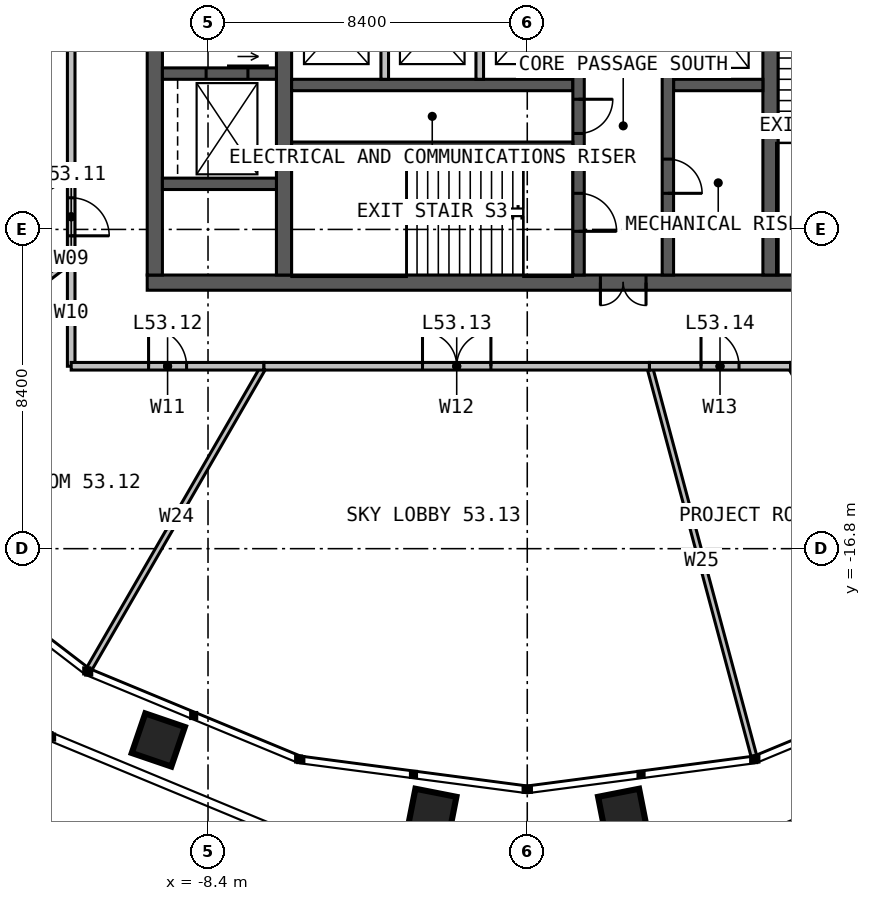
"""IFC4 building model, lengths in metres.
Left out: names, types, materials, properties, quantities, classifications, styles, units other than length and angle.
Written with IfcOpenShell. Run it as: python <this file> out.ifc"""

import sys

from ifc_helpers import new_model, si_unit, direction, frame, frame_2d, origin, place, context, subcontext, project, spatial, rectangle, extrude, element, fill, save


model = new_model("IFC4")
c1 = context("Model", 3, precision=1e-05, world=origin(), true_north=direction((0.0, 1.0)))
c2 = subcontext(c1, "Body", "Model", "MODEL_VIEW")
j1 = project(units=[si_unit("LENGTHUNIT", "METRE"), si_unit("PLANEANGLEUNIT", "RADIAN")], contexts=[c1])
p1 = place(None, origin())
s1 = spatial("IfcSite", under=j1, at=p1, CompositionType="ELEMENT")
p2 = place(p1, origin())
s2 = spatial("IfcBuilding", under=s1, at=p2, CompositionType="ELEMENT")
p3 = place(p2, frame((0.0, 0.0, 220.0)))
s3 = spatial("IfcBuildingStorey", under=s2, at=p3, CompositionType="ELEMENT", Elevation=220.0)
p4 = place(p3, frame((10.0, -9.8, 0.0), z_axis=(0.0, 0.0, 1.0), x_axis=(-1.0, 0.0, 0.0)))
e1 = element("IfcWall", 1, at=p4, inside=s3, PredefinedType="SOLIDWALL", context=c2, shape_type="SweptSolid", body=[
    extrude(rectangle(XDim=20.0, YDim=0.4, at=frame_2d((10.0, 0.0))), origin(), (0.0, 0.0, 1.0), 4.0),
])
p5 = place(p4, frame((6.875, 0.0, 0.0)))
e2 = element("IfcOpeningElement", 2, at=p5, cuts=e1, PredefinedType="OPENING", context=c2, shape_type="SweptSolid", body=[
    extrude(rectangle(XDim=1.2, YDim=2.2, at=frame_2d((0.6, 1.1))), frame((0.0, 0.21, 0.0), z_axis=(0.0, -1.0, 0.0), x_axis=(1.0, 0.0, 0.0)), (0.0, 0.0, 1.0), 0.42),
])
p6 = place(p3, frame((-9.8, 9.6, 0.0), z_axis=(0.0, 0.0, 1.0), x_axis=(0.0, -1.0, 0.0)))
e3 = element("IfcWall", 3, at=p6, inside=s3, PredefinedType="SOLIDWALL", context=c2, shape_type="SweptSolid", body=[
    extrude(rectangle(XDim=19.2, YDim=0.4, at=frame_2d((9.6, 0.0))), origin(), (0.0, 0.0, 1.0), 4.0),
])
p7 = place(p3, frame((-6.4, -9.6, 0.0), z_axis=(0.0, 0.0, 1.0), x_axis=(0.0, 1.0, 0.0)))
e4 = element("IfcWall", 4, at=p7, inside=s3, PredefinedType="SOLIDWALL", context=c2, shape_type="SweptSolid", body=[
    extrude(rectangle(XDim=19.2, YDim=0.4, at=frame_2d((9.6, 0.0))), origin(), (0.0, 0.0, 1.0), 4.0),
])
p8 = place(p7, frame((9.1, 0.0, 0.0)))
e5 = element("IfcOpeningElement", 5, at=p8, cuts=e4, PredefinedType="OPENING", context=c2, shape_type="SweptSolid", body=[
    extrude(rectangle(XDim=1.0, YDim=2.2, at=frame_2d((0.5, 1.1))), frame((0.0, 0.21, 0.0), z_axis=(0.0, -1.0, 0.0), x_axis=(1.0, 0.0, 0.0)), (0.0, 0.0, 1.0), 0.42),
])
p9 = place(p3, frame((6.4, 9.6, 0.0), z_axis=(0.0, 0.0, 1.0), x_axis=(0.0, -1.0, 0.0)))
e6 = element("IfcWall", 6, at=p9, inside=s3, PredefinedType="SOLIDWALL", context=c2, shape_type="SweptSolid", body=[
    extrude(rectangle(XDim=19.2, YDim=0.4, at=frame_2d((9.6, 0.0))), origin(), (0.0, 0.0, 1.0), 4.0),
])
p10 = place(p9, frame((9.1, 0.0, 0.0)))
e7 = element("IfcOpeningElement", 7, at=p10, cuts=e6, PredefinedType="OPENING", context=c2, shape_type="SweptSolid", body=[
    extrude(rectangle(XDim=1.0, YDim=2.2, at=frame_2d((0.5, 1.1))), frame((0.0, 0.21, 0.0), z_axis=(0.0, -1.0, 0.0), x_axis=(1.0, 0.0, 0.0)), (0.0, 0.0, 1.0), 0.42),
])
p11 = place(p3, frame((-6.2, -4.6, 0.0), z_axis=(0.0, 0.0, 1.0), x_axis=(1.0, 0.0, 0.0)))
e8 = element("IfcWall", 8, at=p11, inside=s3, PredefinedType="SOLIDWALL", context=c2, shape_type="SweptSolid", body=[
    extrude(rectangle(XDim=7.4, YDim=0.3, at=frame_2d((3.7, 0.0))), origin(), (0.0, 0.0, 1.0), 4.0),
])
p12 = place(p3, frame((3.85, -4.6, 0.0), z_axis=(0.0, 0.0, 1.0), x_axis=(1.0, 0.0, 0.0)))
e9 = element("IfcWall", 9, at=p12, inside=s3, PredefinedType="SOLIDWALL", context=c2, shape_type="SweptSolid", body=[
    extrude(rectangle(XDim=2.35, YDim=0.3, at=frame_2d((1.175, 0.0))), origin(), (0.0, 0.0, 1.0), 4.0),
])
p13 = place(p3, frame((1.35, -1.45, 0.0), z_axis=(0.0, 0.0, 1.0), x_axis=(0.0, -1.0, 0.0)))
e10 = element("IfcWall", 10, at=p13, inside=s3, PredefinedType="SOLIDWALL", context=c2, shape_type="SweptSolid", body=[
    extrude(rectangle(XDim=8.15, YDim=0.3, at=frame_2d((4.075, 0.0))), origin(), (0.0, 0.0, 1.0), 4.0),
])
p14 = place(p13, frame((6.0, 0.0, 0.0)))
e11 = element("IfcOpeningElement", 11, at=p14, cuts=e10, PredefinedType="OPENING", context=c2, shape_type="SweptSolid", body=[
    extrude(rectangle(XDim=1.0, YDim=2.2, at=frame_2d((0.5, 1.1))), frame((0.0, 0.16, 0.0), z_axis=(0.0, -1.0, 0.0), x_axis=(1.0, 0.0, 0.0)), (0.0, 0.0, 1.0), 0.32),
])
p15 = place(p13, frame((3.525, 0.0, 0.0)))
e12 = element("IfcOpeningElement", 12, at=p15, cuts=e10, PredefinedType="OPENING", context=c2, shape_type="SweptSolid", body=[
    extrude(rectangle(XDim=0.9, YDim=2.2, at=frame_2d((0.45, 1.1))), frame((0.0, 0.16, 0.0), z_axis=(0.0, -1.0, 0.0), x_axis=(1.0, 0.0, 0.0)), (0.0, 0.0, 1.0), 0.32),
])
p16 = place(p3, frame((3.7, -1.45, 0.0), z_axis=(0.0, 0.0, 1.0), x_axis=(0.0, -1.0, 0.0)))
e13 = element("IfcWall", 13, at=p16, inside=s3, PredefinedType="SOLIDWALL", context=c2, shape_type="SweptSolid", body=[
    extrude(rectangle(XDim=8.15, YDim=0.3, at=frame_2d((4.075, 0.0))), origin(), (0.0, 0.0, 1.0), 4.0),
])
p17 = place(p16, frame((5.1, 0.0, 0.0)))
e14 = element("IfcOpeningElement", 14, at=p17, cuts=e13, PredefinedType="OPENING", context=c2, shape_type="SweptSolid", body=[
    extrude(rectangle(XDim=0.9, YDim=2.2, at=frame_2d((0.45, 1.1))), frame((0.0, 0.16, 0.0), z_axis=(0.0, -1.0, 0.0), x_axis=(1.0, 0.0, 0.0)), (0.0, 0.0, 1.0), 0.32),
])
p18 = place(p3, frame((-6.2, -6.2, 0.0), z_axis=(0.0, 0.0, 1.0), x_axis=(1.0, 0.0, 0.0)))
e15 = element("IfcWall", 15, at=p18, inside=s3, PredefinedType="SOLIDWALL", context=c2, shape_type="SweptSolid", body=[
    extrude(rectangle(XDim=7.4, YDim=0.2, at=frame_2d((3.7, 0.0))), origin(), (0.0, 0.0, 1.0), 4.0),
])
p19 = place(p3, frame((-9.6, -4.3, 0.0), z_axis=(0.0, 0.0, 1.0), x_axis=(1.0, 0.0, 0.0)))
e16 = element("IfcWall", 16, at=p19, inside=s3, PredefinedType="SOLIDWALL", context=c2, shape_type="SweptSolid", body=[
    extrude(rectangle(XDim=3.0, YDim=0.3, at=frame_2d((1.5, 0.0))), origin(), (0.0, 0.0, 1.0), 4.0),
])
p20 = place(p19, frame((1.15, 0.0, 0.0)))
e17 = element("IfcOpeningElement", 17, at=p20, cuts=e16, PredefinedType="OPENING", context=c2, shape_type="SweptSolid", body=[
    extrude(rectangle(XDim=1.1, YDim=2.2, at=frame_2d((0.55, 1.1))), frame((0.0, 0.16, 0.0), z_axis=(0.0, -1.0, 0.0), x_axis=(1.0, 0.0, 0.0)), (0.0, 0.0, 1.0), 0.32),
])
p21 = place(p3, frame((-9.6, -7.2, 0.0), z_axis=(0.0, 0.0, 1.0), x_axis=(1.0, 0.0, 0.0)))
e18 = element("IfcWall", 18, at=p21, inside=s3, PredefinedType="SOLIDWALL", context=c2, shape_type="SweptSolid", body=[
    extrude(rectangle(XDim=3.0, YDim=0.3, at=frame_2d((1.5, 0.0))), origin(), (0.0, 0.0, 1.0), 4.0),
])
for number, where, z_axis, x_axis in (
    (19, (-3.75, -1.75, 0.0), (0.0, 0.0, 1.0), (0.0, -1.0, 0.0)),
    (20, (-1.25, -1.75, 0.0), (0.0, 0.0, 1.0), (0.0, -1.0, 0.0)),
):
    element("IfcWall", number, at=place(p3, frame(where, z_axis=z_axis, x_axis=x_axis)), inside=s3, PredefinedType="SOLIDWALL", context=c2, shape_type="SweptSolid", body=[
        extrude(rectangle(XDim=2.7, YDim=0.2, at=frame_2d((1.35, 0.0))), origin(), (0.0, 0.0, 1.0), 3.75),
    ])
p22 = place(p3, frame((-12.0, -6.928, 0.0), z_axis=(0.0, 0.0, 1.0), x_axis=(-0.866021843099, -0.500006167237, 0.0)))
e21 = element("IfcWall", 21, at=p22, inside=s3, PredefinedType="PARTITIONING", context=c2, shape_type="SweptSolid", body=[
    extrude(rectangle(XDim=9.187, YDim=0.15, at=frame_2d((4.594, 0.0))), origin(), (0.0, 0.0, 1.0), 2.89),
])
p23 = place(p3, frame((-12.0, -9.208, 0.0), z_axis=(0.0, 0.0, 1.0), x_axis=(-0.793364023141, -0.608747506595, 0.0)))
e22 = element("IfcWall", 22, at=p23, inside=s3, PredefinedType="PARTITIONING", context=c2, shape_type="SweptSolid", body=[
    extrude(rectangle(XDim=7.72, YDim=0.15, at=frame_2d((3.86, 0.0))), origin(), (0.0, 0.0, 1.0), 2.79),
])
p24 = place(p3, frame((-6.928, -12.0, 0.0), z_axis=(0.0, 0.0, 1.0), x_axis=(-0.500006167237, -0.866021843099, 0.0)))
e23 = element("IfcWall", 23, at=p24, inside=s3, PredefinedType="PARTITIONING", context=c2, shape_type="SweptSolid", body=[
    extrude(rectangle(XDim=9.187, YDim=0.15, at=frame_2d((4.594, 0.0))), origin(), (0.0, 0.0, 1.0), 2.89),
])
p25 = place(p3, frame((3.215, -12.0, 0.0), z_axis=(0.0, 0.0, 1.0), x_axis=(0.258831459304, -0.965922499828, 0.0)))
e24 = element("IfcWall", 24, at=p25, inside=s3, PredefinedType="PARTITIONING", context=c2, shape_type="SweptSolid", body=[
    extrude(rectangle(XDim=10.62, YDim=0.15, at=frame_2d((5.31, 0.0))), origin(), (0.0, 0.0, 1.0), 2.89),
])
p26 = place(p3, frame((6.928, -12.0, 0.0), z_axis=(0.0, 0.0, 1.0), x_axis=(0.500006167237, -0.866021843099, 0.0)))
e25 = element("IfcWall", 25, at=p26, inside=s3, PredefinedType="PARTITIONING", context=c2, shape_type="SweptSolid", body=[
    extrude(rectangle(XDim=9.187, YDim=0.15, at=frame_2d((4.594, 0.0))), origin(), (0.0, 0.0, 1.0), 2.89),
])
p27 = place(p3, frame((-12.0, 6.928, 0.0), z_axis=(0.0, 0.0, 1.0), x_axis=(0.0, -1.0, 0.0)))
e26 = element("IfcWall", 26, at=p27, inside=s3, PredefinedType="PARTITIONING", context=c2, shape_type="SweptSolid", body=[
    extrude(rectangle(XDim=13.856, YDim=0.2, at=frame_2d((6.928, 0.0))), origin(), (0.0, 0.0, 1.0), 3.8),
])
p28 = place(p27, frame((6.028, 0.0, 0.0)))
e27 = element("IfcOpeningElement", 27, at=p28, cuts=e26, PredefinedType="OPENING", context=c2, shape_type="SweptSolid", body=[
    extrude(rectangle(XDim=1.8, YDim=2.2, at=frame_2d((0.9, 1.1))), frame((0.0, 0.11, 0.0), z_axis=(0.0, -1.0, 0.0), x_axis=(1.0, 0.0, 0.0)), (0.0, 0.0, 1.0), 0.22),
])
p29 = place(p3, frame((-12.0, -6.928, 0.0), z_axis=(0.0, 0.0, 1.0), x_axis=(0.0, -1.0, 0.0)))
e28 = element("IfcWall", 28, at=p29, inside=s3, PredefinedType="PARTITIONING", context=c2, shape_type="SweptSolid", body=[
    extrude(rectangle(XDim=2.28, YDim=0.2, at=frame_2d((1.14, 0.0))), origin(), (0.0, 0.0, 1.0), 3.8),
])
p30 = place(p29, frame((0.64, 0.0, 0.0)))
e29 = element("IfcOpeningElement", 29, at=p30, cuts=e28, PredefinedType="OPENING", context=c2, shape_type="SweptSolid", body=[
    extrude(rectangle(XDim=1.0, YDim=2.2, at=frame_2d((0.5, 1.1))), frame((0.0, 0.11, 0.0), z_axis=(0.0, -1.0, 0.0), x_axis=(1.0, 0.0, 0.0)), (0.0, 0.0, 1.0), 0.22),
])
p31 = place(p3, frame((-12.0, -9.208, 0.0), z_axis=(0.0, 0.0, 1.0), x_axis=(0.0, -1.0, 0.0)))
e30 = element("IfcWall", 30, at=p31, inside=s3, PredefinedType="PARTITIONING", context=c2, shape_type="SweptSolid", body=[
    extrude(rectangle(XDim=2.792, YDim=0.2, at=frame_2d((1.396, 0.0))), origin(), (0.0, 0.0, 1.0), 3.8),
])
p32 = place(p3, frame((-12.0, -12.0, 0.0), z_axis=(0.0, 0.0, 1.0), x_axis=(1.0, 0.0, 0.0)))
e31 = element("IfcWall", 31, at=p32, inside=s3, PredefinedType="PARTITIONING", context=c2, shape_type="SweptSolid", body=[
    extrude(rectangle(XDim=5.072, YDim=0.2, at=frame_2d((2.536, 0.0))), origin(), (0.0, 0.0, 1.0), 3.8),
])
p33 = place(p32, frame((2.036, 0.0, 0.0)))
e32 = element("IfcOpeningElement", 32, at=p33, cuts=e31, PredefinedType="OPENING", context=c2, shape_type="SweptSolid", body=[
    extrude(rectangle(XDim=1.0, YDim=2.2, at=frame_2d((0.5, 1.1))), frame((0.0, 0.11, 0.0), z_axis=(0.0, -1.0, 0.0), x_axis=(1.0, 0.0, 0.0)), (0.0, 0.0, 1.0), 0.22),
])
p34 = place(p3, frame((-6.928, -12.0, 0.0), z_axis=(0.0, 0.0, 1.0), x_axis=(1.0, 0.0, 0.0)))
e33 = element("IfcWall", 33, at=p34, inside=s3, PredefinedType="PARTITIONING", context=c2, shape_type="SweptSolid", body=[
    extrude(rectangle(XDim=10.144, YDim=0.2, at=frame_2d((5.072, 0.0))), origin(), (0.0, 0.0, 1.0), 3.8),
])
p35 = place(p34, frame((4.172, 0.0, 0.0)))
e34 = element("IfcOpeningElement", 34, at=p35, cuts=e33, PredefinedType="OPENING", context=c2, shape_type="SweptSolid", body=[
    extrude(rectangle(XDim=1.8, YDim=2.2, at=frame_2d((0.9, 1.1))), frame((0.0, 0.11, 0.0), z_axis=(0.0, -1.0, 0.0), x_axis=(1.0, 0.0, 0.0)), (0.0, 0.0, 1.0), 0.22),
])
p36 = place(p3, frame((3.215, -12.0, 0.0), z_axis=(0.0, 0.0, 1.0), x_axis=(1.0, 0.0, 0.0)))
e35 = element("IfcWall", 35, at=p36, inside=s3, PredefinedType="PARTITIONING", context=c2, shape_type="SweptSolid", body=[
    extrude(rectangle(XDim=3.713, YDim=0.2, at=frame_2d((1.856, 0.0))), origin(), (0.0, 0.0, 1.0), 3.8),
])
p37 = place(p36, frame((1.356, 0.0, 0.0)))
e36 = element("IfcOpeningElement", 36, at=p37, cuts=e35, PredefinedType="OPENING", context=c2, shape_type="SweptSolid", body=[
    extrude(rectangle(XDim=1.0, YDim=2.2, at=frame_2d((0.5, 1.1))), frame((0.0, 0.11, 0.0), z_axis=(0.0, -1.0, 0.0), x_axis=(1.0, 0.0, 0.0)), (0.0, 0.0, 1.0), 0.22),
])
p38 = place(p3, frame((6.928, -12.0, 0.0), z_axis=(0.0, 0.0, 1.0), x_axis=(1.0, 0.0, 0.0)))
e37 = element("IfcWall", 37, at=p38, inside=s3, PredefinedType="PARTITIONING", context=c2, shape_type="SweptSolid", body=[
    extrude(rectangle(XDim=5.072, YDim=0.2, at=frame_2d((2.536, 0.0))), origin(), (0.0, 0.0, 1.0), 3.8),
])
p39 = place(p5, origin())
e38 = element("IfcDoor", 38, at=p39, inside=s3, OperationType="DOUBLE_DOOR_SINGLE_SWING", PredefinedType="DOOR", context=c2, shape_type="SweptSolid", body=[
    extrude(rectangle(XDim=1.2, YDim=2.2, at=frame_2d((0.6, 1.1))), frame((0.0, 0.025, 0.0), z_axis=(0.0, -1.0, 0.0), x_axis=(1.0, 0.0, 0.0)), (0.0, 0.0, 1.0), 0.05),
])
fill(e2, e38)
p40 = place(p14, origin())
e39 = element("IfcDoor", 39, at=p40, inside=s3, OperationType="SINGLE_SWING_RIGHT", PredefinedType="DOOR", context=c2, shape_type="SweptSolid", body=[
    extrude(rectangle(XDim=1.0, YDim=2.2, at=frame_2d((0.5, 1.1))), frame((0.0, 0.025, 0.0), z_axis=(0.0, -1.0, 0.0), x_axis=(1.0, 0.0, 0.0)), (0.0, 0.0, 1.0), 0.05),
])
fill(e11, e39)
p41 = place(p15, origin())
e40 = element("IfcDoor", 40, at=p41, inside=s3, OperationType="SINGLE_SWING_LEFT", PredefinedType="DOOR", context=c2, shape_type="SweptSolid", body=[
    extrude(rectangle(XDim=0.9, YDim=2.2, at=frame_2d((0.45, 1.1))), frame((0.0, 0.025, 0.0), z_axis=(0.0, -1.0, 0.0), x_axis=(1.0, 0.0, 0.0)), (0.0, 0.0, 1.0), 0.05),
])
fill(e12, e40)
p42 = place(p17, origin())
e41 = element("IfcDoor", 41, at=p42, inside=s3, OperationType="SINGLE_SWING_RIGHT", PredefinedType="DOOR", context=c2, shape_type="SweptSolid", body=[
    extrude(rectangle(XDim=0.9, YDim=2.2, at=frame_2d((0.45, 1.1))), frame((0.0, 0.025, 0.0), z_axis=(0.0, -1.0, 0.0), x_axis=(1.0, 0.0, 0.0)), (0.0, 0.0, 1.0), 0.05),
])
fill(e14, e41)
p43 = place(p20, origin())
e42 = element("IfcDoor", 42, at=p43, inside=s3, OperationType="SLIDING_TO_LEFT", PredefinedType="DOOR", context=c2, shape_type="SweptSolid", body=[
    extrude(rectangle(XDim=1.1, YDim=2.2, at=frame_2d((0.55, 1.1))), frame((0.0, 0.025, 0.0), z_axis=(0.0, -1.0, 0.0), x_axis=(1.0, 0.0, 0.0)), (0.0, 0.0, 1.0), 0.05),
])
fill(e17, e42)
p44 = place(p30, origin())
e43 = element("IfcDoor", 43, at=p44, inside=s3, OperationType="SINGLE_SWING_RIGHT", PredefinedType="DOOR", context=c2, shape_type="SweptSolid", body=[
    extrude(rectangle(XDim=1.0, YDim=2.2, at=frame_2d((0.5, 1.1))), frame((0.0, 0.025, 0.0), z_axis=(0.0, -1.0, 0.0), x_axis=(1.0, 0.0, 0.0)), (0.0, 0.0, 1.0), 0.05),
])
fill(e29, e43)
p45 = place(p33, origin())
e44 = element("IfcDoor", 44, at=p45, inside=s3, OperationType="SINGLE_SWING_LEFT", PredefinedType="DOOR", context=c2, shape_type="SweptSolid", body=[
    extrude(rectangle(XDim=1.0, YDim=2.2, at=frame_2d((0.5, 1.1))), frame((0.0, 0.025, 0.0), z_axis=(0.0, -1.0, 0.0), x_axis=(1.0, 0.0, 0.0)), (0.0, 0.0, 1.0), 0.05),
])
fill(e32, e44)
p46 = place(p35, origin())
e45 = element("IfcDoor", 45, at=p46, inside=s3, OperationType="DOUBLE_DOOR_SINGLE_SWING", PredefinedType="DOOR", context=c2, shape_type="SweptSolid", body=[
    extrude(rectangle(XDim=1.8, YDim=2.2, at=frame_2d((0.9, 1.1))), frame((0.0, 0.025, 0.0), z_axis=(0.0, -1.0, 0.0), x_axis=(1.0, 0.0, 0.0)), (0.0, 0.0, 1.0), 0.05),
])
fill(e34, e45)
p47 = place(p37, origin())
e46 = element("IfcDoor", 46, at=p47, inside=s3, OperationType="SINGLE_SWING_LEFT", PredefinedType="DOOR", context=c2, shape_type="SweptSolid", body=[
    extrude(rectangle(XDim=1.0, YDim=2.2, at=frame_2d((0.5, 1.1))), frame((0.0, 0.025, 0.0), z_axis=(0.0, -1.0, 0.0), x_axis=(1.0, 0.0, 0.0)), (0.0, 0.0, 1.0), 0.05),
])
fill(e36, e46)
save(model, sys.argv[1])
